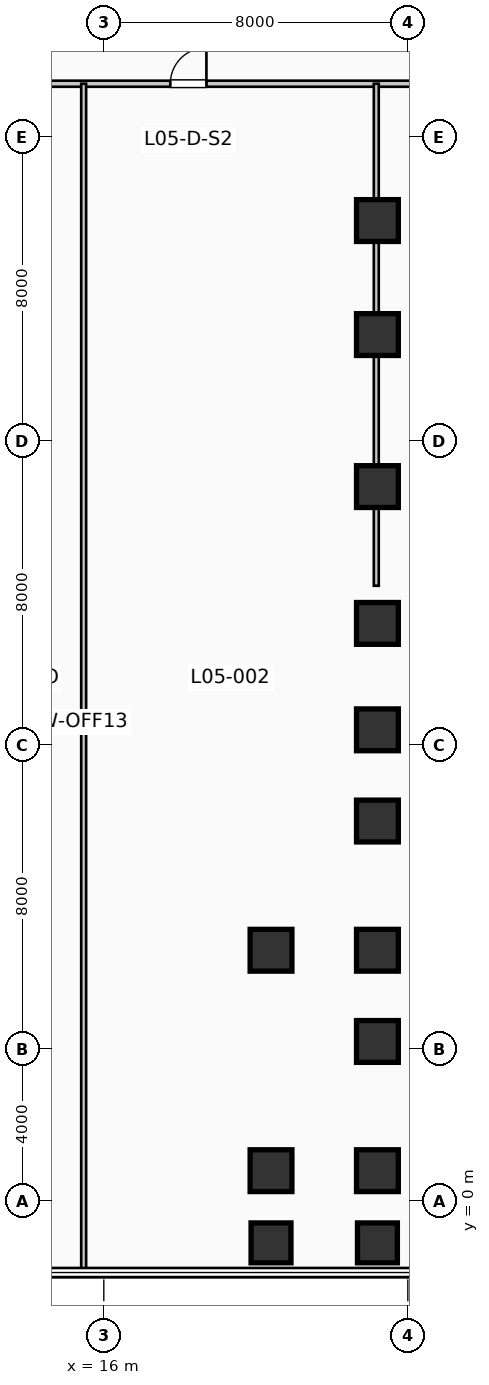
"""IFC4 building model, lengths in metres.
Left out: names, types, materials, properties, quantities, classifications, styles, units other than length and angle.
Written with IfcOpenShell. Run it as: python <this file> out.ifc"""

import sys

from ifc_helpers import new_model, si_unit, direction, frame, frame_2d, origin, origin_2d, place, context, subcontext, project, spatial, rectangle, extrude, element, fill, save


model = new_model("IFC4")
c1 = context("Model", 3, precision=1e-05, world=origin(), true_north=direction((0.0, 1.0)))
c2 = subcontext(c1, "Body", "Model", "MODEL_VIEW")
j1 = project(units=[si_unit("LENGTHUNIT", "METRE"), si_unit("PLANEANGLEUNIT", "RADIAN")], contexts=[c1])
p1 = place(None, origin())
s1 = spatial("IfcSite", under=j1, at=p1, CompositionType="ELEMENT")
p2 = place(p1, origin())
s2 = spatial("IfcBuilding", under=s1, at=p2, CompositionType="ELEMENT")
p3 = place(p2, frame((0.0, 0.0, 25.74)))
s3 = spatial("IfcBuildingStorey", under=s2, at=p3, CompositionType="ELEMENT", Elevation=25.74)
p4 = place(p3, frame((20.4, -1.1, 0.0), z_axis=(0.0, 0.0, 1.0), x_axis=(1.0, 0.0, 0.0)))
e1 = element("IfcColumn", 1, at=p4, inside=s3, PredefinedType="COLUMN", context=c2, shape_type="SweptSolid", body=[
    extrude(rectangle(XDim=1.05, YDim=1.05, at=origin_2d()), origin(), (0.0, 0.0, 1.0), 4.62),
])
for number, where, z_axis, x_axis in (
    (2, (20.4, 0.8, 0.0), (0.0, 0.0, 1.0), (1.0, 0.0, 0.0)),
    (3, (20.4, 6.6, 0.0), (0.0, 0.0, 1.0), (1.0, 0.0, 0.0)),
):
    element("IfcColumn", number, at=place(p3, frame(where, z_axis=z_axis, x_axis=x_axis)), inside=s3, PredefinedType="COLUMN", context=c2, shape_type="SweptSolid", body=[
        extrude(rectangle(XDim=1.1, YDim=1.1, at=origin_2d()), origin(), (0.0, 0.0, 1.0), 4.62),
    ])
p5 = place(p3, frame((23.2, -1.1, 0.0), z_axis=(0.0, 0.0, 1.0), x_axis=(1.0, 0.0, 0.0)))
e4 = element("IfcColumn", 4, at=p5, inside=s3, PredefinedType="COLUMN", context=c2, shape_type="SweptSolid", body=[
    extrude(rectangle(XDim=1.05, YDim=1.05, at=origin_2d()), origin(), (0.0, 0.0, 1.0), 4.62),
])
for number, where, z_axis, x_axis in (
    (5, (23.2, 0.8, 0.0), (0.0, 0.0, 1.0), (1.0, 0.0, 0.0)),
    (6, (23.2, 4.2, 0.0), (0.0, 0.0, 1.0), (1.0, 0.0, 0.0)),
    (7, (23.2, 6.6, 0.0), (0.0, 0.0, 1.0), (1.0, 0.0, 0.0)),
    (8, (23.2, 10.0, 0.0), (0.0, 0.0, 1.0), (1.0, 0.0, 0.0)),
    (9, (23.2, 12.4, 0.0), (0.0, 0.0, 1.0), (1.0, 0.0, 0.0)),
    (10, (23.2, 15.2, 0.0), (0.0, 0.0, 1.0), (1.0, 0.0, 0.0)),
    (11, (23.2, 18.8, 0.0), (0.0, 0.0, 1.0), (1.0, 0.0, 0.0)),
    (12, (23.2, 22.8, 0.0), (0.0, 0.0, 1.0), (1.0, 0.0, 0.0)),
    (13, (23.2, 25.8, 0.0), (0.0, 0.0, 1.0), (1.0, 0.0, 0.0)),
):
    element("IfcColumn", number, at=place(p3, frame(where, z_axis=z_axis, x_axis=x_axis)), inside=s3, PredefinedType="COLUMN", context=c2, shape_type="SweptSolid", body=[
        extrude(rectangle(XDim=1.1, YDim=1.1, at=origin_2d()), origin(), (0.0, 0.0, 1.0), 4.62),
    ])
p6 = place(p3, frame((7.6, 29.4, 0.0), z_axis=(0.0, 0.0, 1.0), x_axis=(1.0, 0.0, 0.0)))
e14 = element("IfcWall", 14, at=p6, inside=s3, PredefinedType="PARTITIONING", context=c2, shape_type="SweptSolid", body=[
    extrude(rectangle(XDim=43.75, YDim=0.16, at=frame_2d((21.875, 0.0))), origin(), (0.0, 0.0, 1.0), 4.025),
])
p7 = place(p6, frame((2.28, 0.0, 0.0)))
e15 = element("IfcOpeningElement", 15, at=p7, cuts=e14, PredefinedType="OPENING", context=c2, shape_type="SweptSolid", body=[
    extrude(rectangle(XDim=0.95, YDim=2.15, at=frame_2d((0.475, 1.075))), frame((0.0, 0.09, 0.0), z_axis=(0.0, -1.0, 0.0), x_axis=(1.0, 0.0, 0.0)), (0.0, 0.0, 1.0), 0.18),
])
p8 = place(p6, frame((10.15, 0.0, 0.0)))
e16 = element("IfcOpeningElement", 16, at=p8, cuts=e14, PredefinedType="OPENING", context=c2, shape_type="SweptSolid", body=[
    extrude(rectangle(XDim=0.95, YDim=2.15, at=frame_2d((0.475, 1.075))), frame((0.0, 0.09, 0.0), z_axis=(0.0, -1.0, 0.0), x_axis=(1.0, 0.0, 0.0)), (0.0, 0.0, 1.0), 0.18),
])
p9 = place(p6, frame((17.85, 0.0, 0.0)))
e17 = element("IfcOpeningElement", 17, at=p9, cuts=e14, PredefinedType="OPENING", context=c2, shape_type="SweptSolid", body=[
    extrude(rectangle(XDim=0.95, YDim=2.15, at=frame_2d((0.475, 1.075))), frame((0.0, 0.09, 0.0), z_axis=(0.0, -1.0, 0.0), x_axis=(1.0, 0.0, 0.0)), (0.0, 0.0, 1.0), 0.18),
])
p10 = place(p6, frame((32.25, 0.0, 0.0)))
e18 = element("IfcOpeningElement", 18, at=p10, cuts=e14, PredefinedType="OPENING", context=c2, shape_type="SweptSolid", body=[
    extrude(rectangle(XDim=0.95, YDim=2.15, at=frame_2d((0.475, 1.075))), frame((0.0, 0.09, 0.0), z_axis=(0.0, -1.0, 0.0), x_axis=(1.0, 0.0, 0.0)), (0.0, 0.0, 1.0), 0.18),
])
p11 = place(p3, frame((15.47, -1.81, 0.0), z_axis=(0.0, 0.0, 1.0), x_axis=(0.0, 1.0, 0.0)))
e19 = element("IfcWall", 19, at=p11, inside=s3, PredefinedType="PARTITIONING", context=c2, shape_type="SweptSolid", body=[
    extrude(rectangle(XDim=31.21, YDim=0.13, at=frame_2d((15.605, 0.0))), origin(), (0.0, 0.0, 1.0), 4.37),
])
p12 = place(p3, frame((23.17, 16.19, 0.0), z_axis=(0.0, 0.0, 1.0), x_axis=(0.0, 1.0, 0.0)))
e20 = element("IfcWall", 20, at=p12, inside=s3, PredefinedType="PARTITIONING", context=c2, shape_type="SweptSolid", body=[
    extrude(rectangle(XDim=13.21, YDim=0.13, at=frame_2d((6.605, 0.0))), origin(), (0.0, 0.0, 1.0), 3.555),
])
p13 = place(p8, origin())
e21 = element("IfcDoor", 21, at=p13, inside=s3, OperationType="SINGLE_SWING_RIGHT", PredefinedType="DOOR", context=c2, shape_type="SweptSolid", body=[
    extrude(rectangle(XDim=0.95, YDim=2.15, at=frame_2d((0.475, 1.075))), frame((0.0, 0.025, 0.0), z_axis=(0.0, -1.0, 0.0), x_axis=(1.0, 0.0, 0.0)), (0.0, 0.0, 1.0), 0.05),
])
fill(e16, e21)
save(model, sys.argv[1])
